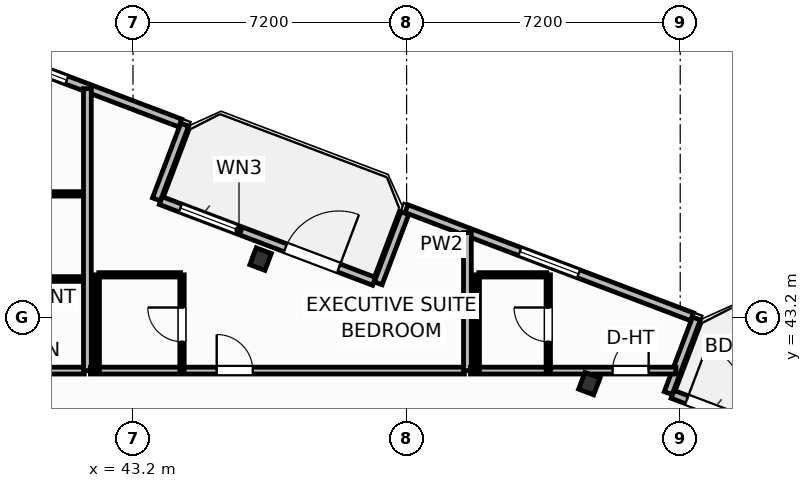
"""IFC4 building model, lengths in metres.
Left out: names, types, materials, properties, quantities, classifications, styles, units other than length and angle.
Written with IfcOpenShell. Run it as: python <this file> out.ifc"""

import sys

from ifc_helpers import new_model, si_unit, direction, frame, frame_2d, origin, origin_2d, place, context, subcontext, project, spatial, rectangle, i_section, extrude, element, fill, save


model = new_model("IFC4")
c1 = context("Model", 3, precision=1e-05, world=origin(), true_north=direction((0.0, 1.0)))
c2 = subcontext(c1, "Body", "Model", "MODEL_VIEW")
j1 = project(units=[si_unit("LENGTHUNIT", "METRE"), si_unit("PLANEANGLEUNIT", "RADIAN")], contexts=[c1])
p1 = place(None, origin())
s1 = spatial("IfcSite", under=j1, at=p1, CompositionType="ELEMENT")
p2 = place(p1, origin())
s2 = spatial("IfcBuilding", under=s1, at=p2, CompositionType="ELEMENT")
p3 = place(p2, frame((0.0, 0.0, 98.4)))
s3 = spatial("IfcBuildingStorey", under=s2, at=p3, CompositionType="ELEMENT", Elevation=98.4)
for number, where, z_axis, x_axis in (
    (1, (55.208, 41.459, 0.0), (0.0, 0.0, 1.0), (0.935, -0.354, 0.0)),
    (2, (46.557, 44.734, 0.0), (0.0, 0.0, 1.0), (0.935, -0.354, 0.0)),
):
    element("IfcColumn", number, at=place(p3, frame(where, z_axis=z_axis, x_axis=x_axis)), inside=s3, PredefinedType="COLUMN", context=c2, shape_type="SweptSolid", body=[
        extrude(i_section(OverallWidth=0.424, OverallDepth=0.474, WebThickness=0.048, FlangeThickness=0.077, FilletRadius=0.025, at=origin_2d()), origin(), (0.0, 0.0, 1.0), 3.7),
    ])
p4 = place(p3, frame((43.932, 46.273, 0.0), z_axis=(0.0, 0.0, 1.0), x_axis=(0.93521416643, -0.354082565101, 0.0)))
e3 = element("IfcWall", 3, at=p4, inside=s3, PredefinedType="SOLIDWALL", context=c2, shape_type="SweptSolid", body=[
    extrude(rectangle(XDim=6.0, YDim=0.22, at=frame_2d((3.0, 0.0))), origin(), (0.0, 0.0, 1.0), 2.73),
])
p5 = place(p4, frame((3.508, 0.0, 0.0)))
e4 = element("IfcOpeningElement", 4, at=p5, cuts=e3, PredefinedType="OPENING", context=c2, shape_type="SweptSolid", body=[
    extrude(rectangle(XDim=1.5, YDim=2.25, at=frame_2d((0.75, 1.125))), frame((0.0, 0.12, 0.0), z_axis=(0.0, -1.0, 0.0), x_axis=(1.0, 0.0, 0.0)), (0.0, 0.0, 1.0), 0.24),
])
p6 = place(p4, frame((0.55, 0.0, 0.75)))
e5 = element("IfcOpeningElement", 5, at=p6, cuts=e3, PredefinedType="OPENING", context=c2, shape_type="SweptSolid", body=[
    extrude(rectangle(XDim=1.65, YDim=1.65, at=frame_2d((0.825, 0.825))), frame((0.0, 0.12, 0.0), z_axis=(0.0, -1.0, 0.0), x_axis=(1.0, 0.0, 0.0)), (0.0, 0.0, 1.0), 0.24),
])
p7 = place(p3, frame((57.399, 41.175, 0.0), z_axis=(0.0, 0.0, 1.0), x_axis=(0.935227640088, -0.354046976001, 0.0)))
e6 = element("IfcWall", 6, at=p7, inside=s3, PredefinedType="SOLIDWALL", context=c2, shape_type="SweptSolid", body=[
    extrude(rectangle(XDim=6.0, YDim=0.22, at=frame_2d((3.0, 0.0))), origin(), (0.0, 0.0, 1.0), 2.73),
])
p8 = place(p7, frame((0.4, 0.0, 0.0)))
e7 = element("IfcOpeningElement", 7, at=p8, cuts=e6, PredefinedType="OPENING", context=c2, shape_type="SweptSolid", body=[
    extrude(rectangle(XDim=1.5, YDim=2.25, at=frame_2d((0.75, 1.125))), frame((0.0, 0.12, 0.0), z_axis=(0.0, -1.0, 0.0), x_axis=(1.0, 0.0, 0.0)), (0.0, 0.0, 1.0), 0.24),
])
p9 = place(p3, frame((57.284, 41.208, 0.0), z_axis=(0.0, 0.0, 1.0), x_axis=(0.354128469405, 0.935196785258, 0.0)))
e8 = element("IfcWall", 8, at=p9, inside=s3, PredefinedType="SOLIDWALL", context=c2, shape_type="SweptSolid", body=[
    extrude(rectangle(XDim=2.1, YDim=0.22, at=frame_2d((1.05, 0.0))), origin(), (0.0, 0.0, 1.0), 2.73),
])
p10 = place(p3, frame((57.91, 43.216, 0.0), z_axis=(0.0, 0.0, 1.0), x_axis=(-0.935220736163, 0.354065212427, 0.0)))
e9 = element("IfcWall", 9, at=p10, inside=s3, PredefinedType="SOLIDWALL", context=c2, shape_type="SweptSolid", body=[
    extrude(rectangle(XDim=8.035, YDim=0.22, at=frame_2d((4.018, 0.0))), origin(), (0.0, 0.0, 1.0), 2.73),
])
p11 = place(p10, frame((3.192, 0.0, 0.8)))
e10 = element("IfcOpeningElement", 10, at=p11, cuts=e9, PredefinedType="OPENING", context=c2, shape_type="SweptSolid", body=[
    extrude(rectangle(XDim=1.65, YDim=1.65, at=frame_2d((0.825, 0.825))), frame((0.0, 0.12, 0.0), z_axis=(0.0, -1.0, 0.0), x_axis=(1.0, 0.0, 0.0)), (0.0, 0.0, 1.0), 0.24),
])
p12 = place(p3, frame((50.352, 45.944, 0.0), z_axis=(0.0, 0.0, 1.0), x_axis=(-0.354061611705, -0.935222099352, 0.0)))
e11 = element("IfcWall", 11, at=p12, inside=s3, PredefinedType="SOLIDWALL", context=c2, shape_type="SweptSolid", body=[
    extrude(rectangle(XDim=1.975, YDim=0.22, at=frame_2d((0.987, 0.0))), origin(), (0.0, 0.0, 1.0), 2.73),
])
p13 = place(p3, frame((43.817, 46.306, 0.0), z_axis=(0.0, 0.0, 1.0), x_axis=(0.353988291547, 0.935249854022, 0.0)))
e12 = element("IfcWall", 12, at=p13, inside=s3, PredefinedType="SOLIDWALL", context=c2, shape_type="SweptSolid", body=[
    extrude(rectangle(XDim=2.1, YDim=0.22, at=frame_2d((1.05, 0.0))), origin(), (0.0, 0.0, 1.0), 2.73),
])
p14 = place(p3, frame((44.443, 48.314, 0.0), z_axis=(0.0, 0.0, 1.0), x_axis=(-0.935226988293, 0.354048697735, 0.0)))
e13 = element("IfcWall", 13, at=p14, inside=s3, PredefinedType="SOLIDWALL", context=c2, shape_type="SweptSolid", body=[
    extrude(rectangle(XDim=8.035, YDim=0.22, at=frame_2d((4.018, 0.0))), origin(), (0.0, 0.0, 1.0), 2.73),
])
p15 = place(p14, frame((3.192, 0.0, 0.8)))
e14 = element("IfcOpeningElement", 14, at=p15, cuts=e13, PredefinedType="OPENING", context=c2, shape_type="SweptSolid", body=[
    extrude(rectangle(XDim=1.65, YDim=1.65, at=frame_2d((0.825, 0.825))), frame((0.0, 0.12, 0.0), z_axis=(0.0, -1.0, 0.0), x_axis=(1.0, 0.0, 0.0)), (0.0, 0.0, 1.0), 0.24),
])
p16 = place(p3, frame((32.08, 41.8, 0.0), z_axis=(0.0, 0.0, 1.0), x_axis=(1.0, 0.0, 0.0)))
e15 = element("IfcWall", 15, at=p16, inside=s3, PredefinedType="PARTITIONING", context=c2, shape_type="SweptSolid", body=[
    extrude(rectangle(XDim=9.84, YDim=0.18, at=frame_2d((4.92, 0.0))), origin(), (0.0, 0.0, 1.0), 3.45),
])
p17 = place(p16, frame((2.302, 0.0, 0.0)))
e16 = element("IfcOpeningElement", 16, at=p17, cuts=e15, PredefinedType="OPENING", context=c2, shape_type="SweptSolid", body=[
    extrude(rectangle(XDim=1.0, YDim=2.2, at=frame_2d((0.5, 1.1))), frame((0.0, 0.1, 0.0), z_axis=(0.0, -1.0, 0.0), x_axis=(1.0, 0.0, 0.0)), (0.0, 0.0, 1.0), 0.2),
])
p18 = place(p3, frame((37.825, 44.21, 0.0), z_axis=(0.0, 0.0, 1.0), x_axis=(1.0, 0.0, 0.0)))
e17 = element("IfcWall", 17, at=p18, inside=s3, PredefinedType="PARTITIONING", context=c2, shape_type="SweptSolid", body=[
    extrude(rectangle(XDim=4.095, YDim=0.125, at=frame_2d((2.047, 0.0))), origin(), (0.0, 0.0, 1.0), 2.972),
])
p19 = place(p3, frame((37.825, 46.45, 0.0), z_axis=(0.0, 0.0, 1.0), x_axis=(1.0, 0.0, 0.0)))
e18 = element("IfcWall", 18, at=p19, inside=s3, PredefinedType="PARTITIONING", context=c2, shape_type="SweptSolid", body=[
    extrude(rectangle(XDim=4.095, YDim=0.115, at=frame_2d((2.047, 0.0))), origin(), (0.0, 0.0, 1.0), 3.45),
])
p20 = place(p3, frame((42.0, 41.8, 0.0), z_axis=(0.0, 0.0, 1.0), x_axis=(0.0, 1.0, 0.0)))
e19 = element("IfcWall", 19, at=p20, inside=s3, PredefinedType="PARTITIONING", context=c2, shape_type="SweptSolid", body=[
    extrude(rectangle(XDim=7.418, YDim=0.205, at=frame_2d((3.709, 0.0))), origin(), (0.0, 0.0, 1.0), 3.45),
])
p21 = place(p3, frame((42.08, 41.8, 0.0), z_axis=(0.0, 0.0, 1.0), x_axis=(1.0, 0.0, 0.0)))
e20 = element("IfcWall", 20, at=p21, inside=s3, PredefinedType="PARTITIONING", context=c2, shape_type="SweptSolid", body=[
    extrude(rectangle(XDim=9.84, YDim=0.18, at=frame_2d((4.92, 0.0))), origin(), (0.0, 0.0, 1.0), 3.45),
])
p22 = place(p21, frame((3.323, 0.0, 0.0)))
e21 = element("IfcOpeningElement", 21, at=p22, cuts=e20, PredefinedType="OPENING", context=c2, shape_type="SweptSolid", body=[
    extrude(rectangle(XDim=0.95, YDim=2.15, at=frame_2d((0.475, 1.075))), frame((0.0, 0.1, 0.0), z_axis=(0.0, -1.0, 0.0), x_axis=(1.0, 0.0, 0.0)), (0.0, 0.0, 1.0), 0.2),
])
p23 = place(p3, frame((42.3, 44.32, 0.0), z_axis=(0.0, 0.0, 1.0), x_axis=(1.0, 0.0, 0.0)))
e22 = element("IfcWall", 22, at=p23, inside=s3, PredefinedType="PARTITIONING", context=c2, shape_type="SweptSolid", body=[
    extrude(rectangle(XDim=2.15, YDim=0.115, at=frame_2d((1.075, 0.0))), origin(), (0.0, 0.0, 1.0), 3.45),
])
p24 = place(p3, frame((44.49, 41.8, 0.0), z_axis=(0.0, 0.0, 1.0), x_axis=(0.0, 1.0, 0.0)))
e23 = element("IfcWall", 23, at=p24, inside=s3, PredefinedType="PARTITIONING", context=c2, shape_type="SweptSolid", body=[
    extrude(rectangle(XDim=2.52, YDim=0.115, at=frame_2d((1.26, 0.0))), origin(), (0.0, 0.0, 1.0), 3.45),
])
p25 = place(p24, frame((0.76, 0.0, 0.0)))
e24 = element("IfcOpeningElement", 24, at=p25, cuts=e23, PredefinedType="OPENING", context=c2, shape_type="SweptSolid", body=[
    extrude(rectangle(XDim=0.9, YDim=2.05, at=frame_2d((0.45, 1.025))), frame((0.0, 0.067, 0.0), z_axis=(0.0, -1.0, 0.0), x_axis=(1.0, 0.0, 0.0)), (0.0, 0.0, 1.0), 0.135),
])
p26 = place(p3, frame((42.26, 41.8, 0.0), z_axis=(0.0, 0.0, 1.0), x_axis=(0.0, 1.0, 0.0)))
e25 = element("IfcWall", 25, at=p26, inside=s3, PredefinedType="PARTITIONING", context=c2, shape_type="SweptSolid", body=[
    extrude(rectangle(XDim=2.52, YDim=0.115, at=frame_2d((1.26, 0.0))), origin(), (0.0, 0.0, 1.0), 3.45),
])
p27 = place(p3, frame((52.0, 41.8, 0.0), z_axis=(0.0, 0.0, 1.0), x_axis=(0.0, 1.0, 0.0)))
e26 = element("IfcWall", 26, at=p27, inside=s3, PredefinedType="PARTITIONING", context=c2, shape_type="SweptSolid", body=[
    extrude(rectangle(XDim=3.632, YDim=0.205, at=frame_2d((1.816, 0.0))), origin(), (0.0, 0.0, 1.0), 3.45),
])
p28 = place(p3, frame((52.08, 41.8, 0.0), z_axis=(0.0, 0.0, 1.0), x_axis=(1.0, 0.0, 0.0)))
e27 = element("IfcWall", 27, at=p28, inside=s3, PredefinedType="PARTITIONING", context=c2, shape_type="SweptSolid", body=[
    extrude(rectangle(XDim=5.406, YDim=0.18, at=frame_2d((2.703, 0.0))), origin(), (0.0, 0.0, 1.0), 3.45),
])
p29 = place(p28, frame((3.74, 0.0, 0.0)))
e28 = element("IfcOpeningElement", 28, at=p29, cuts=e27, PredefinedType="OPENING", context=c2, shape_type="SweptSolid", body=[
    extrude(rectangle(XDim=0.95, YDim=2.15, at=frame_2d((0.475, 1.075))), frame((0.0, 0.1, 0.0), z_axis=(0.0, -1.0, 0.0), x_axis=(1.0, 0.0, 0.0)), (0.0, 0.0, 1.0), 0.2),
])
p30 = place(p3, frame((52.3, 44.32, 0.0), z_axis=(0.0, 0.0, 1.0), x_axis=(1.0, 0.0, 0.0)))
e29 = element("IfcWall", 29, at=p30, inside=s3, PredefinedType="PARTITIONING", context=c2, shape_type="SweptSolid", body=[
    extrude(rectangle(XDim=1.788, YDim=0.115, at=frame_2d((0.894, 0.0))), origin(), (0.0, 0.0, 1.0), 3.45),
])
p31 = place(p3, frame((54.128, 41.8, 0.0), z_axis=(0.0, 0.0, 1.0), x_axis=(0.0, 1.0, 0.0)))
e30 = element("IfcWall", 30, at=p31, inside=s3, PredefinedType="PARTITIONING", context=c2, shape_type="SweptSolid", body=[
    extrude(rectangle(XDim=2.52, YDim=0.115, at=frame_2d((1.26, 0.0))), origin(), (0.0, 0.0, 1.0), 3.45),
])
p32 = place(p31, frame((0.76, 0.0, 0.0)))
e31 = element("IfcOpeningElement", 31, at=p32, cuts=e30, PredefinedType="OPENING", context=c2, shape_type="SweptSolid", body=[
    extrude(rectangle(XDim=0.9, YDim=2.05, at=frame_2d((0.45, 1.025))), frame((0.0, 0.067, 0.0), z_axis=(0.0, -1.0, 0.0), x_axis=(1.0, 0.0, 0.0)), (0.0, 0.0, 1.0), 0.135),
])
p33 = place(p3, frame((52.26, 41.8, 0.0), z_axis=(0.0, 0.0, 1.0), x_axis=(0.0, 1.0, 0.0)))
e32 = element("IfcWall", 32, at=p33, inside=s3, PredefinedType="PARTITIONING", context=c2, shape_type="SweptSolid", body=[
    extrude(rectangle(XDim=2.52, YDim=0.115, at=frame_2d((1.26, 0.0))), origin(), (0.0, 0.0, 1.0), 3.45),
])
p34 = place(p5, origin())
e33 = element("IfcDoor", 33, at=p34, inside=s3, OperationType="SINGLE_SWING_RIGHT", PredefinedType="DOOR", context=c2, shape_type="SweptSolid", body=[
    extrude(rectangle(XDim=1.5, YDim=2.25, at=frame_2d((0.75, 1.125))), frame((0.0, 0.025, 0.0), z_axis=(0.0, -1.0, 0.0), x_axis=(1.0, 0.0, 0.0)), (0.0, 0.0, 1.0), 0.05),
])
fill(e4, e33)
p35 = place(p6, origin())
e34 = element("IfcWindow", 34, at=p35, inside=s3, PartitioningType="SINGLE_PANEL", PredefinedType="WINDOW", context=c2, shape_type="SweptSolid", body=[
    extrude(rectangle(XDim=1.65, YDim=1.65, at=frame_2d((0.825, 0.825))), frame((0.0, 0.03, 0.0), z_axis=(0.0, -1.0, 0.0), x_axis=(1.0, 0.0, 0.0)), (0.0, 0.0, 1.0), 0.06),
])
fill(e5, e34)
p36 = place(p8, origin())
e35 = element("IfcDoor", 35, at=p36, inside=s3, OperationType="SINGLE_SWING_LEFT", PredefinedType="DOOR", context=c2, shape_type="SweptSolid", body=[
    extrude(rectangle(XDim=1.5, YDim=2.25, at=frame_2d((0.75, 1.125))), frame((0.0, 0.025, 0.0), z_axis=(0.0, -1.0, 0.0), x_axis=(1.0, 0.0, 0.0)), (0.0, 0.0, 1.0), 0.05),
])
fill(e7, e35)
p37 = place(p11, origin())
e36 = element("IfcWindow", 36, at=p37, inside=s3, PartitioningType="SINGLE_PANEL", PredefinedType="WINDOW", context=c2, shape_type="SweptSolid", body=[
    extrude(rectangle(XDim=1.65, YDim=1.65, at=frame_2d((0.825, 0.825))), frame((0.0, 0.03, 0.0), z_axis=(0.0, -1.0, 0.0), x_axis=(1.0, 0.0, 0.0)), (0.0, 0.0, 1.0), 0.06),
])
fill(e10, e36)
p38 = place(p15, origin())
e37 = element("IfcWindow", 37, at=p38, inside=s3, PartitioningType="SINGLE_PANEL", PredefinedType="WINDOW", context=c2, shape_type="SweptSolid", body=[
    extrude(rectangle(XDim=1.65, YDim=1.65, at=frame_2d((0.825, 0.825))), frame((0.0, 0.03, 0.0), z_axis=(0.0, -1.0, 0.0), x_axis=(1.0, 0.0, 0.0)), (0.0, 0.0, 1.0), 0.06),
])
fill(e14, e37)
p39 = place(p22, origin())
e38 = element("IfcDoor", 38, at=p39, inside=s3, OperationType="SINGLE_SWING_LEFT", PredefinedType="DOOR", context=c2, shape_type="SweptSolid", body=[
    extrude(rectangle(XDim=0.95, YDim=2.15, at=frame_2d((0.475, 1.075))), frame((0.0, 0.025, 0.0), z_axis=(0.0, -1.0, 0.0), x_axis=(1.0, 0.0, 0.0)), (0.0, 0.0, 1.0), 0.05),
])
fill(e21, e38)
p40 = place(p25, origin())
e39 = element("IfcDoor", 39, at=p40, inside=s3, OperationType="SINGLE_SWING_RIGHT", PredefinedType="DOOR", context=c2, shape_type="SweptSolid", body=[
    extrude(rectangle(XDim=0.9, YDim=2.05, at=frame_2d((0.45, 1.025))), frame((0.0, 0.025, 0.0), z_axis=(0.0, -1.0, 0.0), x_axis=(1.0, 0.0, 0.0)), (0.0, 0.0, 1.0), 0.05),
])
fill(e24, e39)
p41 = place(p29, origin())
e40 = element("IfcDoor", 40, at=p41, inside=s3, OperationType="SINGLE_SWING_RIGHT", PredefinedType="DOOR", context=c2, shape_type="SweptSolid", body=[
    extrude(rectangle(XDim=0.95, YDim=2.15, at=frame_2d((0.475, 1.075))), frame((0.0, 0.025, 0.0), z_axis=(0.0, -1.0, 0.0), x_axis=(1.0, 0.0, 0.0)), (0.0, 0.0, 1.0), 0.05),
])
fill(e28, e40)
p42 = place(p32, origin())
e41 = element("IfcDoor", 41, at=p42, inside=s3, OperationType="SINGLE_SWING_RIGHT", PredefinedType="DOOR", context=c2, shape_type="SweptSolid", body=[
    extrude(rectangle(XDim=0.9, YDim=2.05, at=frame_2d((0.45, 1.025))), frame((0.0, 0.025, 0.0), z_axis=(0.0, -1.0, 0.0), x_axis=(1.0, 0.0, 0.0)), (0.0, 0.0, 1.0), 0.05),
])
fill(e31, e41)
save(model, sys.argv[1])
